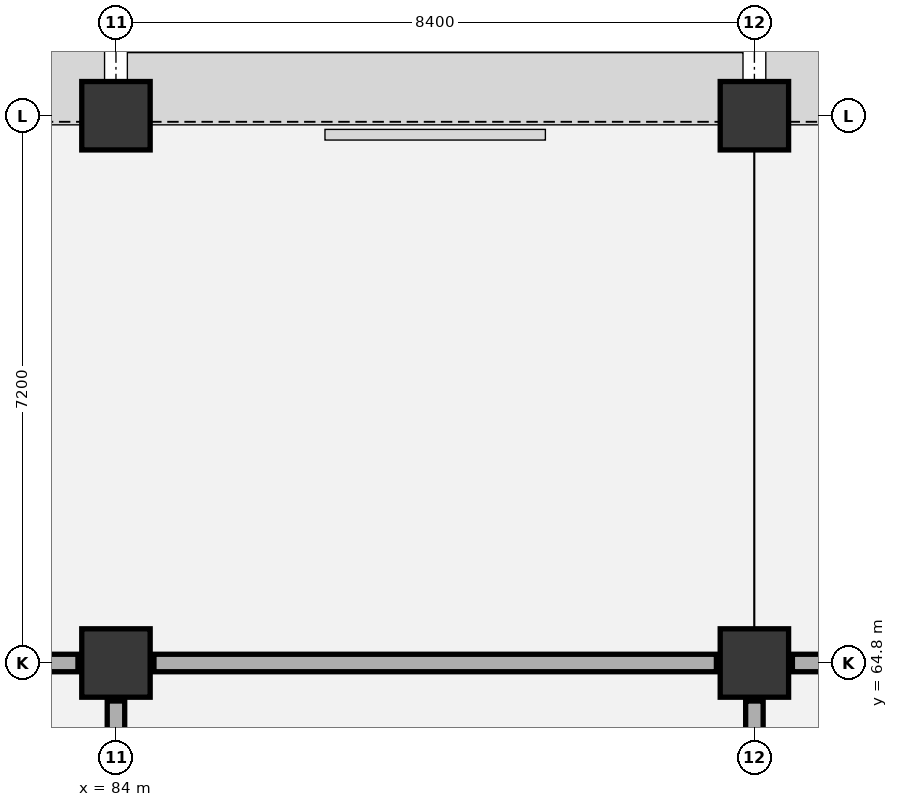
"""IFC4 building model, lengths in metres.
Left out: names, types, materials, properties, quantities, classifications, styles, units other than length and angle.
Written with IfcOpenShell. Run it as: python <this file> out.ifc"""

import sys

from ifc_helpers import new_model, si_unit, direction, frame, frame_2d, origin, origin_2d, place, context, subcontext, project, spatial, rectangle, circle, extrude, element, save


model = new_model("IFC4")
c1 = context("Model", 3, precision=1e-05, world=origin(), true_north=direction((0.0, 1.0)))
c2 = subcontext(c1, "Body", "Model", "MODEL_VIEW")
j1 = project(units=[si_unit("LENGTHUNIT", "METRE"), si_unit("PLANEANGLEUNIT", "RADIAN")], contexts=[c1])
p1 = place(None, origin())
s1 = spatial("IfcSite", under=j1, at=p1, CompositionType="ELEMENT")
p2 = place(p1, origin())
s2 = spatial("IfcBuilding", under=s1, at=p2, CompositionType="ELEMENT")
p3 = place(p2, origin())
s3 = spatial("IfcBuildingStorey", under=s2, at=p3, CompositionType="ELEMENT", Elevation=0.0)
p4 = place(p3, frame((84.0, 64.8, 0.0), z_axis=(0.0, 0.0, 1.0), x_axis=(1.0, 0.0, 0.0)))
e1 = element("IfcColumn", 1, at=p4, inside=s3, PredefinedType="COLUMN", context=c2, shape_type="SweptSolid", body=[
    extrude(rectangle(XDim=0.9, YDim=0.9, at=origin_2d()), origin(), (0.0, 0.0, 1.0), 6.0),
])
p5 = place(p3, frame((84.0, 72.0, 0.0), z_axis=(0.0, 0.0, 1.0), x_axis=(1.0, 0.0, 0.0)))
e2 = element("IfcColumn", 2, at=p5, inside=s3, PredefinedType="COLUMN", context=c2, shape_type="SweptSolid", body=[
    extrude(circle(Radius=0.45, at=origin_2d()), origin(), (0.0, 0.0, 1.0), 6.0),
])
p6 = place(p3, frame((92.4, 64.8, 0.0), z_axis=(0.0, 0.0, 1.0), x_axis=(1.0, 0.0, 0.0)))
e3 = element("IfcColumn", 3, at=p6, inside=s3, PredefinedType="COLUMN", context=c2, shape_type="SweptSolid", body=[
    extrude(rectangle(XDim=0.9, YDim=0.9, at=origin_2d()), origin(), (0.0, 0.0, 1.0), 6.0),
])
p7 = place(p3, frame((92.4, 72.0, 0.0), z_axis=(0.0, 0.0, 1.0), x_axis=(1.0, 0.0, 0.0)))
e4 = element("IfcColumn", 4, at=p7, inside=s3, PredefinedType="COLUMN", context=c2, shape_type="SweptSolid", body=[
    extrude(circle(Radius=0.45, at=origin_2d()), origin(), (0.0, 0.0, 1.0), 6.0),
])
p8 = place(p3, frame((84.0, 58.1, 0.0), z_axis=(0.0, 0.0, 1.0), x_axis=(0.0, 1.0, 0.0)))
e5 = element("IfcWall", 5, at=p8, inside=s3, PredefinedType="PARTITIONING", context=c2, shape_type="SweptSolid", body=[
    extrude(rectangle(XDim=6.2, YDim=0.23, at=frame_2d((3.1, 0.0))), origin(), (0.0, 0.0, 1.0), 5.27),
])
p9 = place(p8, frame((0.25, 0.0, 0.0)))
e6 = element("IfcOpeningElement", 6, at=p9, cuts=e5, PredefinedType="OPENING", context=c2, shape_type="SweptSolid", body=[
    extrude(rectangle(XDim=1.05, YDim=2.15, at=frame_2d((0.525, 1.075))), frame((0.0, 0.125, 0.0), z_axis=(0.0, -1.0, 0.0), x_axis=(1.0, 0.0, 0.0)), (0.0, 0.0, 1.0), 0.25),
])
p10 = place(p3, frame((76.1, 64.8, 0.0), z_axis=(0.0, 0.0, 1.0), x_axis=(1.0, 0.0, 0.0)))
e7 = element("IfcWall", 7, at=p10, inside=s3, PredefinedType="PARTITIONING", context=c2, shape_type="SweptSolid", body=[
    extrude(rectangle(XDim=7.4, YDim=0.23, at=frame_2d((3.7, 0.0))), origin(), (0.0, 0.0, 1.0), 4.87),
])
p11 = place(p3, frame((92.4, 58.1, 0.0), z_axis=(0.0, 0.0, 1.0), x_axis=(0.0, 1.0, 0.0)))
e8 = element("IfcWall", 8, at=p11, inside=s3, PredefinedType="PARTITIONING", context=c2, shape_type="SweptSolid", body=[
    extrude(rectangle(XDim=6.2, YDim=0.23, at=frame_2d((3.1, 0.0))), origin(), (0.0, 0.0, 1.0), 4.92),
])
p12 = place(p11, frame((0.25, 0.0, 0.0)))
e9 = element("IfcOpeningElement", 9, at=p12, cuts=e8, PredefinedType="OPENING", context=c2, shape_type="SweptSolid", body=[
    extrude(rectangle(XDim=1.05, YDim=2.15, at=frame_2d((0.525, 1.075))), frame((0.0, 0.125, 0.0), z_axis=(0.0, -1.0, 0.0), x_axis=(1.0, 0.0, 0.0)), (0.0, 0.0, 1.0), 0.25),
])
p13 = place(p3, frame((84.5, 64.8, 0.0), z_axis=(0.0, 0.0, 1.0), x_axis=(1.0, 0.0, 0.0)))
e10 = element("IfcWall", 10, at=p13, inside=s3, PredefinedType="PARTITIONING", context=c2, shape_type="SweptSolid", body=[
    extrude(rectangle(XDim=7.4, YDim=0.23, at=frame_2d((3.7, 0.0))), origin(), (0.0, 0.0, 1.0), 4.87),
])
p14 = place(p3, frame((92.9, 64.8, 0.0), z_axis=(0.0, 0.0, 1.0), x_axis=(1.0, 0.0, 0.0)))
e11 = element("IfcWall", 11, at=p14, inside=s3, PredefinedType="PARTITIONING", context=c2, shape_type="SweptSolid", body=[
    extrude(rectangle(XDim=7.4, YDim=0.23, at=frame_2d((3.7, 0.0))), origin(), (0.0, 0.0, 1.0), 4.87),
])
save(model, sys.argv[1])
